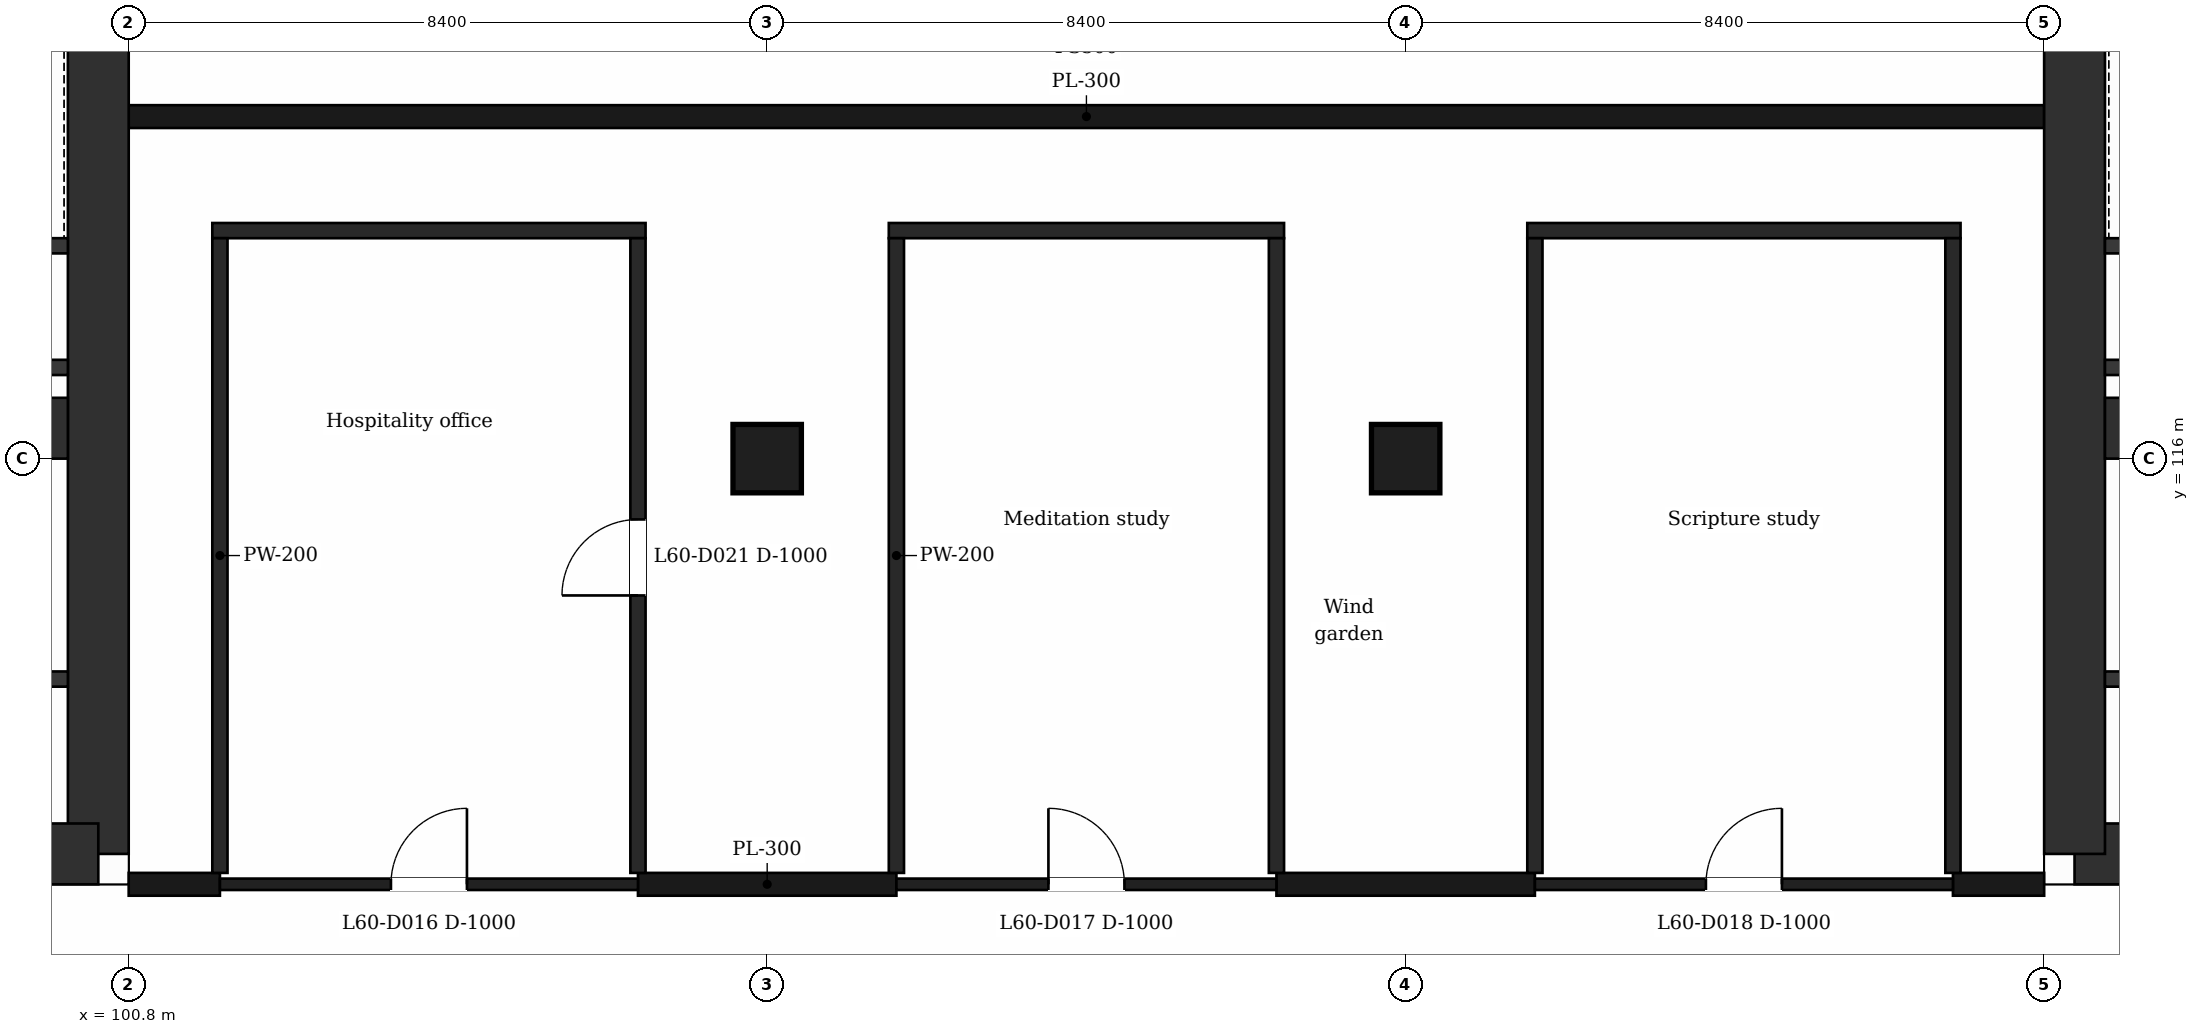
"""IFC4 building model, lengths in metres.
Left out: names, types, materials, properties, quantities, classifications, styles, units other than length and angle.
Written with IfcOpenShell. Run it as: python <this file> out.ifc"""

import sys

from ifc_helpers import new_model, si_unit, direction, frame, frame_2d, origin, origin_2d, place, context, subcontext, project, spatial, rectangle, extrude, element, fill, save


model = new_model("IFC4")
c1 = context("Model", 3, precision=1e-05, world=origin(), true_north=direction((0.0, 1.0)))
c2 = subcontext(c1, "Body", "Model", "MODEL_VIEW")
j1 = project(units=[si_unit("LENGTHUNIT", "METRE"), si_unit("PLANEANGLEUNIT", "RADIAN")], contexts=[c1])
p1 = place(None, origin())
s1 = spatial("IfcSite", under=j1, at=p1, CompositionType="ELEMENT")
p2 = place(p1, origin())
s2 = spatial("IfcBuilding", under=s1, at=p2, CompositionType="ELEMENT")
p3 = place(p2, frame((0.0, 0.0, 246.6)))
s3 = spatial("IfcBuildingStorey", under=s2, at=p3, CompositionType="ELEMENT", Elevation=246.6)
p4 = place(p3, frame((100.4, 132.0, 0.0), z_axis=(0.0, 0.0, 1.0), x_axis=(0.0, -1.0, 0.0)))
e1 = element("IfcWall", 1, at=p4, inside=s3, PredefinedType="SHEAR", context=c2, shape_type="SweptSolid", body=[
    extrude(rectangle(XDim=21.2, YDim=0.8, at=frame_2d((10.6, 0.0))), origin(), (0.0, 0.0, 1.0), 7.4),
])
p5 = place(p4, frame((7.85, 0.0, 0.0)))
e2 = element("IfcOpeningElement", 2, at=p5, cuts=e1, PredefinedType="OPENING", context=c2, shape_type="SweptSolid", body=[
    extrude(rectangle(XDim=1.4, YDim=2.1, at=frame_2d((0.7, 1.05))), frame((0.0, 0.41, 0.0), z_axis=(0.0, -1.0, 0.0), x_axis=(1.0, 0.0, 0.0)), (0.0, 0.0, 1.0), 0.82),
])
p6 = place(p3, frame((100.4, 110.8, 0.0), z_axis=(0.0, 0.0, 1.0), x_axis=(-1.0, 0.0, 0.0)))
e3 = element("IfcWall", 3, at=p6, inside=s3, PredefinedType="SHEAR", context=c2, shape_type="SweptSolid", body=[
    extrude(rectangle(XDim=14.273, YDim=0.8, at=frame_2d((7.137, 0.0))), origin(), (0.0, 0.0, 1.0), 7.4),
])
p7 = place(p6, frame((5.908, 0.0, 0.0)))
e4 = element("IfcOpeningElement", 4, at=p7, cuts=e3, PredefinedType="OPENING", context=c2, shape_type="SweptSolid", body=[
    extrude(rectangle(XDim=1.4, YDim=2.1, at=frame_2d((0.7, 1.05))), frame((0.0, 0.41, 0.0), z_axis=(0.0, -1.0, 0.0), x_axis=(1.0, 0.0, 0.0)), (0.0, 0.0, 1.0), 0.82),
])
p8 = place(p3, frame((94.7, 116.4, 0.0), z_axis=(0.0, 0.0, 1.0), x_axis=(1.0, 0.0, 0.0)))
e5 = element("IfcWall", 5, at=p8, inside=s3, PredefinedType="SHEAR", context=c2, shape_type="SweptSolid", body=[
    extrude(rectangle(XDim=5.3, YDim=0.8, at=frame_2d((2.65, 0.0))), origin(), (0.0, 0.0, 1.0), 7.4),
])
p9 = place(p3, frame((140.673, 110.8, 0.0), z_axis=(0.0, 0.0, 1.0), x_axis=(-1.0, 0.0, 0.0)))
e6 = element("IfcWall", 6, at=p9, inside=s3, PredefinedType="SHEAR", context=c2, shape_type="SweptSolid", body=[
    extrude(rectangle(XDim=14.273, YDim=0.8, at=frame_2d((7.137, 0.0))), origin(), (0.0, 0.0, 1.0), 7.4),
])
p10 = place(p9, frame((6.965, 0.0, 0.0)))
e7 = element("IfcOpeningElement", 7, at=p10, cuts=e6, PredefinedType="OPENING", context=c2, shape_type="SweptSolid", body=[
    extrude(rectangle(XDim=1.4, YDim=2.1, at=frame_2d((0.7, 1.05))), frame((0.0, 0.41, 0.0), z_axis=(0.0, -1.0, 0.0), x_axis=(1.0, 0.0, 0.0)), (0.0, 0.0, 1.0), 0.82),
])
p11 = place(p3, frame((126.4, 110.8, 0.0), z_axis=(0.0, 0.0, 1.0), x_axis=(0.0, 1.0, 0.0)))
e8 = element("IfcWall", 8, at=p11, inside=s3, PredefinedType="SHEAR", context=c2, shape_type="SweptSolid", body=[
    extrude(rectangle(XDim=21.2, YDim=0.8, at=frame_2d((10.6, 0.0))), origin(), (0.0, 0.0, 1.0), 7.4),
])
p12 = place(p11, frame((11.95, 0.0, 0.0)))
e9 = element("IfcOpeningElement", 9, at=p12, cuts=e8, PredefinedType="OPENING", context=c2, shape_type="SweptSolid", body=[
    extrude(rectangle(XDim=1.4, YDim=2.1, at=frame_2d((0.7, 1.05))), frame((0.0, 0.41, 0.0), z_axis=(0.0, -1.0, 0.0), x_axis=(1.0, 0.0, 0.0)), (0.0, 0.0, 1.0), 0.82),
])
p13 = place(p3, frame((126.8, 116.4, 0.0), z_axis=(0.0, 0.0, 1.0), x_axis=(1.0, 0.0, 0.0)))
e10 = element("IfcWall", 10, at=p13, inside=s3, PredefinedType="SHEAR", context=c2, shape_type="SweptSolid", body=[
    extrude(rectangle(XDim=5.3, YDim=0.8, at=frame_2d((2.65, 0.0))), origin(), (0.0, 0.0, 1.0), 7.4),
])
for number, where, z_axis, x_axis in (
    (11, (109.2, 116.0, 0.0), (0.0, 0.0, 1.0), (1.0, 0.0, 0.0)),
    (12, (117.6, 116.0, 0.0), (0.0, 0.0, 1.0), (1.0, 0.0, 0.0)),
):
    element("IfcColumn", number, at=place(p3, frame(where, z_axis=z_axis, x_axis=x_axis)), inside=s3, PredefinedType="COLUMN", context=c2, shape_type="SweptSolid", body=[
        extrude(rectangle(XDim=0.9, YDim=0.9, at=origin_2d()), origin(), (0.0, 0.0, 1.0), 7.4),
    ])
p14 = place(p3, frame((100.8, 110.4, 0.0), z_axis=(0.0, 0.0, 1.0), x_axis=(1.0, 0.0, 0.0)))
e13 = element("IfcWall", 13, at=p14, inside=s3, PredefinedType="PARTITIONING", context=c2, shape_type="SweptSolid", body=[
    extrude(rectangle(XDim=1.2, YDim=0.3, at=frame_2d((0.6, 0.0))), origin(), (0.0, 0.0, 1.0), 1.0),
])
p15 = place(p3, frame((107.5, 110.4, 0.0), z_axis=(0.0, 0.0, 1.0), x_axis=(1.0, 0.0, 0.0)))
e14 = element("IfcWall", 14, at=p15, inside=s3, PredefinedType="PARTITIONING", context=c2, shape_type="SweptSolid", body=[
    extrude(rectangle(XDim=3.4, YDim=0.3, at=frame_2d((1.7, 0.0))), origin(), (0.0, 0.0, 1.0), 1.0),
])
p16 = place(p3, frame((115.9, 110.4, 0.0), z_axis=(0.0, 0.0, 1.0), x_axis=(1.0, 0.0, 0.0)))
e15 = element("IfcWall", 15, at=p16, inside=s3, PredefinedType="PARTITIONING", context=c2, shape_type="SweptSolid", body=[
    extrude(rectangle(XDim=3.4, YDim=0.3, at=frame_2d((1.7, 0.0))), origin(), (0.0, 0.0, 1.0), 1.0),
])
p17 = place(p3, frame((124.8, 110.4, 0.0), z_axis=(0.0, 0.0, 1.0), x_axis=(1.0, 0.0, 0.0)))
e16 = element("IfcWall", 16, at=p17, inside=s3, PredefinedType="PARTITIONING", context=c2, shape_type="SweptSolid", body=[
    extrude(rectangle(XDim=1.2, YDim=0.3, at=frame_2d((0.6, 0.0))), origin(), (0.0, 0.0, 1.0), 1.0),
])
p18 = place(p3, frame((102.0, 110.4, 0.0), z_axis=(0.0, 0.0, 1.0), x_axis=(1.0, 0.0, 0.0)))
e17 = element("IfcWall", 17, at=p18, inside=s3, PredefinedType="PARTITIONING", context=c2, shape_type="SweptSolid", body=[
    extrude(rectangle(XDim=5.5, YDim=0.15, at=frame_2d((2.75, 0.0))), origin(), (0.0, 0.0, 1.0), 6.9),
])
p19 = place(p18, frame((2.25, 0.0, 0.0)))
e18 = element("IfcOpeningElement", 18, at=p19, cuts=e17, PredefinedType="OPENING", context=c2, shape_type="SweptSolid", body=[
    extrude(rectangle(XDim=1.0, YDim=2.1, at=frame_2d((0.5, 1.05))), frame((0.0, 0.085, 0.0), z_axis=(0.0, -1.0, 0.0), x_axis=(1.0, 0.0, 0.0)), (0.0, 0.0, 1.0), 0.17),
])
p20 = place(p3, frame((110.9, 110.4, 0.0), z_axis=(0.0, 0.0, 1.0), x_axis=(1.0, 0.0, 0.0)))
e19 = element("IfcWall", 19, at=p20, inside=s3, PredefinedType="PARTITIONING", context=c2, shape_type="SweptSolid", body=[
    extrude(rectangle(XDim=5.0, YDim=0.15, at=frame_2d((2.5, 0.0))), origin(), (0.0, 0.0, 1.0), 6.9),
])
p21 = place(p20, frame((2.0, 0.0, 0.0)))
e20 = element("IfcOpeningElement", 20, at=p21, cuts=e19, PredefinedType="OPENING", context=c2, shape_type="SweptSolid", body=[
    extrude(rectangle(XDim=1.0, YDim=2.1, at=frame_2d((0.5, 1.05))), frame((0.0, 0.085, 0.0), z_axis=(0.0, -1.0, 0.0), x_axis=(1.0, 0.0, 0.0)), (0.0, 0.0, 1.0), 0.17),
])
p22 = place(p3, frame((119.3, 110.4, 0.0), z_axis=(0.0, 0.0, 1.0), x_axis=(1.0, 0.0, 0.0)))
e21 = element("IfcWall", 21, at=p22, inside=s3, PredefinedType="PARTITIONING", context=c2, shape_type="SweptSolid", body=[
    extrude(rectangle(XDim=5.5, YDim=0.15, at=frame_2d((2.75, 0.0))), origin(), (0.0, 0.0, 1.0), 6.9),
])
p23 = place(p22, frame((2.25, 0.0, 0.0)))
e22 = element("IfcOpeningElement", 22, at=p23, cuts=e21, PredefinedType="OPENING", context=c2, shape_type="SweptSolid", body=[
    extrude(rectangle(XDim=1.0, YDim=2.1, at=frame_2d((0.5, 1.05))), frame((0.0, 0.085, 0.0), z_axis=(0.0, -1.0, 0.0), x_axis=(1.0, 0.0, 0.0)), (0.0, 0.0, 1.0), 0.17),
])
p24 = place(p3, frame((95.127, 113.1, 0.0), z_axis=(0.0, 0.0, 1.0), x_axis=(1.0, 0.0, 0.0)))
e23 = element("IfcWall", 23, at=p24, inside=s3, PredefinedType="PARTITIONING", context=c2, shape_type="SweptSolid", body=[
    extrude(rectangle(XDim=4.873, YDim=0.2, at=frame_2d((2.437, 0.0))), origin(), (0.0, 0.0, 1.0), 6.9),
])
p25 = place(p24, frame((2.83, 0.0, 0.0)))
e24 = element("IfcOpeningElement", 24, at=p25, cuts=e23, PredefinedType="OPENING", context=c2, shape_type="SweptSolid", body=[
    extrude(rectangle(XDim=0.9, YDim=2.1, at=frame_2d((0.45, 1.05))), frame((0.0, 0.11, 0.0), z_axis=(0.0, -1.0, 0.0), x_axis=(1.0, 0.0, 0.0)), (0.0, 0.0, 1.0), 0.22),
])
p26 = place(p3, frame((126.8, 113.1, 0.0), z_axis=(0.0, 0.0, 1.0), x_axis=(1.0, 0.0, 0.0)))
e25 = element("IfcWall", 25, at=p26, inside=s3, PredefinedType="PARTITIONING", context=c2, shape_type="SweptSolid", body=[
    extrude(rectangle(XDim=4.873, YDim=0.2, at=frame_2d((2.437, 0.0))), origin(), (0.0, 0.0, 1.0), 6.9),
])
p27 = place(p26, frame((1.936, 0.0, 0.0)))
e26 = element("IfcOpeningElement", 26, at=p27, cuts=e25, PredefinedType="OPENING", context=c2, shape_type="SweptSolid", body=[
    extrude(rectangle(XDim=0.9, YDim=2.1, at=frame_2d((0.45, 1.05))), frame((0.0, 0.11, 0.0), z_axis=(0.0, -1.0, 0.0), x_axis=(1.0, 0.0, 0.0)), (0.0, 0.0, 1.0), 0.22),
])
for number, where, z_axis, x_axis in (
    (27, (95.227, 117.2, 0.0), (0.0, 0.0, 1.0), (1.0, 0.0, 0.0)),
    (28, (126.8, 117.2, 0.0), (0.0, 0.0, 1.0), (1.0, 0.0, 0.0)),
    (29, (95.227, 118.8, 0.0), (0.0, 0.0, 1.0), (1.0, 0.0, 0.0)),
    (30, (126.8, 118.8, 0.0), (0.0, 0.0, 1.0), (1.0, 0.0, 0.0)),
):
    element("IfcWall", number, at=place(p3, frame(where, z_axis=z_axis, x_axis=x_axis)), inside=s3, PredefinedType="PARTITIONING", context=c2, shape_type="SweptSolid", body=[
        extrude(rectangle(XDim=4.773, YDim=0.2, at=frame_2d((2.386, 0.0))), origin(), (0.0, 0.0, 1.0), 6.9),
    ])
p28 = place(p3, frame((101.9, 119.0, 0.0), z_axis=(0.0, 0.0, 1.0), x_axis=(1.0, 0.0, 0.0)))
e31 = element("IfcWall", 31, at=p28, inside=s3, PredefinedType="PARTITIONING", context=c2, shape_type="SweptSolid", body=[
    extrude(rectangle(XDim=5.7, YDim=0.2, at=frame_2d((2.85, 0.0))), origin(), (0.0, 0.0, 1.0), 6.9),
])
p29 = place(p3, frame((110.8, 119.0, 0.0), z_axis=(0.0, 0.0, 1.0), x_axis=(1.0, 0.0, 0.0)))
e32 = element("IfcWall", 32, at=p29, inside=s3, PredefinedType="PARTITIONING", context=c2, shape_type="SweptSolid", body=[
    extrude(rectangle(XDim=5.2, YDim=0.2, at=frame_2d((2.6, 0.0))), origin(), (0.0, 0.0, 1.0), 6.9),
])
p30 = place(p3, frame((119.2, 119.0, 0.0), z_axis=(0.0, 0.0, 1.0), x_axis=(1.0, 0.0, 0.0)))
e33 = element("IfcWall", 33, at=p30, inside=s3, PredefinedType="PARTITIONING", context=c2, shape_type="SweptSolid", body=[
    extrude(rectangle(XDim=5.7, YDim=0.2, at=frame_2d((2.85, 0.0))), origin(), (0.0, 0.0, 1.0), 6.9),
])
p31 = place(p3, frame((100.8, 120.5, 0.0), z_axis=(0.0, 0.0, 1.0), x_axis=(1.0, 0.0, 0.0)))
e34 = element("IfcWall", 34, at=p31, inside=s3, PredefinedType="PARTITIONING", context=c2, shape_type="SweptSolid", body=[
    extrude(rectangle(XDim=25.2, YDim=0.3, at=frame_2d((12.6, 0.0))), origin(), (0.0, 0.0, 1.0), 1.0),
])
p32 = place(p3, frame((102.0, 110.55, 0.0), z_axis=(0.0, 0.0, 1.0), x_axis=(0.0, 1.0, 0.0)))
e35 = element("IfcWall", 35, at=p32, inside=s3, PredefinedType="PARTITIONING", context=c2, shape_type="SweptSolid", body=[
    extrude(rectangle(XDim=8.35, YDim=0.2, at=frame_2d((4.175, 0.0))), origin(), (0.0, 0.0, 1.0), 6.9),
])
p33 = place(p3, frame((107.5, 110.55, 0.0), z_axis=(0.0, 0.0, 1.0), x_axis=(0.0, 1.0, 0.0)))
e36 = element("IfcWall", 36, at=p33, inside=s3, PredefinedType="PARTITIONING", context=c2, shape_type="SweptSolid", body=[
    extrude(rectangle(XDim=8.35, YDim=0.2, at=frame_2d((4.175, 0.0))), origin(), (0.0, 0.0, 1.0), 6.9),
])
p34 = place(p33, frame((3.65, 0.0, 0.0)))
e37 = element("IfcOpeningElement", 37, at=p34, cuts=e36, PredefinedType="OPENING", context=c2, shape_type="SweptSolid", body=[
    extrude(rectangle(XDim=1.0, YDim=2.1, at=frame_2d((0.5, 1.05))), frame((0.0, 0.11, 0.0), z_axis=(0.0, -1.0, 0.0), x_axis=(1.0, 0.0, 0.0)), (0.0, 0.0, 1.0), 0.22),
])
for number, where, z_axis, x_axis in (
    (38, (110.9, 110.55, 0.0), (0.0, 0.0, 1.0), (0.0, 1.0, 0.0)),
    (39, (115.9, 110.55, 0.0), (0.0, 0.0, 1.0), (0.0, 1.0, 0.0)),
    (40, (119.3, 110.55, 0.0), (0.0, 0.0, 1.0), (0.0, 1.0, 0.0)),
    (41, (124.8, 110.55, 0.0), (0.0, 0.0, 1.0), (0.0, 1.0, 0.0)),
):
    element("IfcWall", number, at=place(p3, frame(where, z_axis=z_axis, x_axis=x_axis)), inside=s3, PredefinedType="PARTITIONING", context=c2, shape_type="SweptSolid", body=[
        extrude(rectangle(XDim=8.35, YDim=0.2, at=frame_2d((4.175, 0.0))), origin(), (0.0, 0.0, 1.0), 6.9),
    ])
p35 = place(p19, origin())
e42 = element("IfcDoor", 42, at=p35, inside=s3, OperationType="SINGLE_SWING_RIGHT", PredefinedType="DOOR", context=c2, shape_type="SweptSolid", body=[
    extrude(rectangle(XDim=1.0, YDim=2.1, at=frame_2d((0.5, 1.05))), frame((0.0, 0.025, 0.0), z_axis=(0.0, -1.0, 0.0), x_axis=(1.0, 0.0, 0.0)), (0.0, 0.0, 1.0), 0.05),
])
fill(e18, e42)
p36 = place(p21, origin())
e43 = element("IfcDoor", 43, at=p36, inside=s3, OperationType="SINGLE_SWING_LEFT", PredefinedType="DOOR", context=c2, shape_type="SweptSolid", body=[
    extrude(rectangle(XDim=1.0, YDim=2.1, at=frame_2d((0.5, 1.05))), frame((0.0, 0.025, 0.0), z_axis=(0.0, -1.0, 0.0), x_axis=(1.0, 0.0, 0.0)), (0.0, 0.0, 1.0), 0.05),
])
fill(e20, e43)
p37 = place(p23, origin())
e44 = element("IfcDoor", 44, at=p37, inside=s3, OperationType="SINGLE_SWING_RIGHT", PredefinedType="DOOR", context=c2, shape_type="SweptSolid", body=[
    extrude(rectangle(XDim=1.0, YDim=2.1, at=frame_2d((0.5, 1.05))), frame((0.0, 0.025, 0.0), z_axis=(0.0, -1.0, 0.0), x_axis=(1.0, 0.0, 0.0)), (0.0, 0.0, 1.0), 0.05),
])
fill(e22, e44)
p38 = place(p34, origin())
e45 = element("IfcDoor", 45, at=p38, inside=s3, OperationType="SINGLE_SWING_LEFT", PredefinedType="DOOR", context=c2, shape_type="SweptSolid", body=[
    extrude(rectangle(XDim=1.0, YDim=2.1, at=frame_2d((0.5, 1.05))), frame((0.0, 0.025, 0.0), z_axis=(0.0, -1.0, 0.0), x_axis=(1.0, 0.0, 0.0)), (0.0, 0.0, 1.0), 0.05),
])
fill(e37, e45)
save(model, sys.argv[1])
